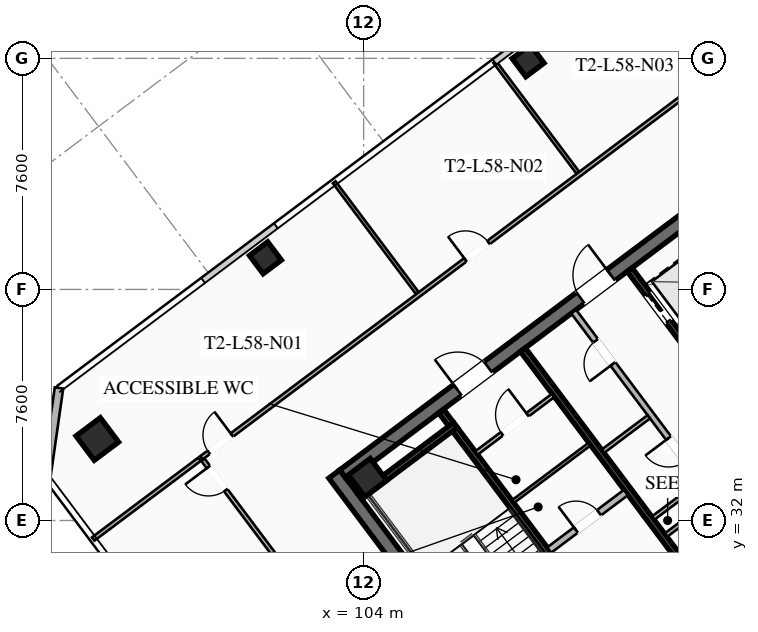
"""IFC4 building model, lengths in metres.
Left out: names, types, materials, properties, quantities, classifications, styles, units other than length and angle.
Written with IfcOpenShell. Run it as: python <this file> out.ifc"""

import sys

from ifc_helpers import new_model, si_unit, direction, frame, frame_2d, origin, origin_2d, place, context, subcontext, project, spatial, rectangle, hollow_rectangle, extrude, element, fill, save


model = new_model("IFC4")
c1 = context("Model", 3, precision=1e-05, world=origin(), true_north=direction((0.0, 1.0)))
c2 = subcontext(c1, "Body", "Model", "MODEL_VIEW")
j1 = project(units=[si_unit("LENGTHUNIT", "METRE"), si_unit("PLANEANGLEUNIT", "RADIAN")], contexts=[c1])
p1 = place(None, origin())
s1 = spatial("IfcSite", under=j1, at=p1, CompositionType="ELEMENT")
p2 = place(p1, origin())
s2 = spatial("IfcBuilding", under=s1, at=p2, CompositionType="ELEMENT")
p3 = place(p2, frame((0.0, 0.0, 214.85)))
s3 = spatial("IfcBuildingStorey", under=s2, at=p3, CompositionType="ELEMENT", Elevation=214.85)
p4 = place(p3, frame((112.396, 21.047, 0.0), z_axis=(0.0, 0.0, 1.0), x_axis=(-0.600005007985, 0.799996243986, 0.0)))
e1 = element("IfcWall", 1, at=p4, inside=s3, PredefinedType="SHEAR", context=c2, shape_type="SweptSolid", body=[
    extrude(rectangle(XDim=15.6, YDim=0.45, at=frame_2d((7.8, 0.0))), origin(), (0.0, 0.0, 1.0), 3.55),
])
p5 = place(p3, frame((103.351, 33.482, 0.0), z_axis=(0.0, 0.0, 1.0), x_axis=(0.8, 0.6, 0.0)))
e2 = element("IfcWall", 2, at=p5, inside=s3, PredefinedType="SHEAR", context=c2, shape_type="SweptSolid", body=[
    extrude(rectangle(XDim=15.26, YDim=0.45, at=frame_2d((7.63, 0.0))), origin(), (0.0, 0.0, 1.0), 3.55),
])
p6 = place(p5, frame((4.68, 0.0, 0.0)))
e3 = element("IfcOpeningElement", 3, at=p6, cuts=e2, PredefinedType="OPENING", context=c2, shape_type="SweptSolid", body=[
    extrude(rectangle(XDim=1.25, YDim=2.25, at=frame_2d((0.625, 1.125))), frame((0.0, 0.235, 0.0), z_axis=(0.0, -1.0, 0.0), x_axis=(1.0, 0.0, 0.0)), (0.0, 0.0, 1.0), 0.47),
])
p7 = place(p5, frame((9.73, 0.0, 0.0)))
e4 = element("IfcOpeningElement", 4, at=p7, cuts=e2, PredefinedType="OPENING", context=c2, shape_type="SweptSolid", body=[
    extrude(rectangle(XDim=1.25, YDim=2.25, at=frame_2d((0.625, 1.125))), frame((0.0, 0.235, 0.0), z_axis=(0.0, -1.0, 0.0), x_axis=(1.0, 0.0, 0.0)), (0.0, 0.0, 1.0), 0.47),
])
p8 = place(p3, frame((104.13, 33.41, 0.0), z_axis=(0.0, 0.0, 1.0), x_axis=(0.799999996291, 0.600000004945, 0.0)))
e5 = element("IfcColumn", 5, at=p8, inside=s3, PredefinedType="COLUMN", context=c2, shape_type="SweptSolid", body=[
    extrude(hollow_rectangle(XDim=0.9, YDim=0.9, WallThickness=0.04, at=origin_2d()), origin(), (0.0, 0.0, 1.0), 3.37),
])
p9 = place(p3, frame((95.24, 34.68, 0.0), z_axis=(0.0, 0.0, 1.0), x_axis=(0.799999996291, 0.600000004945, 0.0)))
e6 = element("IfcColumn", 6, at=p9, inside=s3, PredefinedType="COLUMN", context=c2, shape_type="SweptSolid", body=[
    extrude(hollow_rectangle(XDim=1.0, YDim=1.0, WallThickness=0.04, at=origin_2d()), origin(), (0.0, 0.0, 1.0), 3.37),
])
for number, where, z_axis, x_axis in (
    (7, (109.41, 47.12, 0.0), (0.0, 0.0, 1.0), (0.8, 0.6, 0.0)),
    (8, (100.77, 40.64, 0.0), (0.0, 0.0, 1.0), (0.8, 0.6, 0.0)),
):
    element("IfcColumn", number, at=place(p3, frame(where, z_axis=z_axis, x_axis=x_axis)), inside=s3, PredefinedType="COLUMN", context=c2, shape_type="SweptSolid", body=[
        extrude(hollow_rectangle(XDim=0.75, YDim=0.75, WallThickness=0.032, at=origin_2d()), origin(), (0.0, 0.0, 1.0), 3.37),
    ])
p10 = place(p3, frame((93.56, 33.42, 0.0), z_axis=(0.0, 0.0, 1.0), x_axis=(0.14138683146, 0.989954425158, 0.0)))
e9 = element("IfcWall", 9, at=p10, inside=s3, PredefinedType="SOLIDWALL", context=c2, shape_type="SweptSolid", body=[
    extrude(rectangle(XDim=2.97, YDim=0.28, at=frame_2d((1.485, 0.0))), origin(), (0.0, 0.0, 1.0), 3.37),
])
p11 = place(p3, frame((111.44, 29.08, 0.0), z_axis=(0.0, 0.0, 1.0), x_axis=(-0.59999041401, 0.800007189403, 0.0)))
e10 = element("IfcWall", 10, at=p11, inside=s3, PredefinedType="SHEAR", context=c2, shape_type="SweptSolid", body=[
    extrude(rectangle(XDim=8.15, YDim=0.2, at=frame_2d((4.075, 0.0))), origin(), (0.0, 0.0, 1.0), 3.37),
])
p12 = place(p11, frame((0.45, 0.0, 0.0)))
e11 = element("IfcOpeningElement", 11, at=p12, cuts=e10, PredefinedType="OPENING", context=c2, shape_type="SweptSolid", body=[
    extrude(rectangle(XDim=1.15, YDim=2.2, at=frame_2d((0.575, 1.1))), frame((0.0, 0.11, 0.0), z_axis=(0.0, -1.0, 0.0), x_axis=(1.0, 0.0, 0.0)), (0.0, 0.0, 1.0), 0.22),
])
p13 = place(p3, frame((103.876, 32.782, 0.0), z_axis=(0.0, 0.0, 1.0), x_axis=(0.800014909178, 0.599980120581, 0.0)))
e12 = element("IfcWall", 12, at=p13, inside=s3, PredefinedType="SHEAR", context=c2, shape_type="SweptSolid", body=[
    extrude(rectangle(XDim=3.93, YDim=0.2, at=frame_2d((1.965, 0.0))), origin(), (0.0, 0.0, 1.0), 3.37),
])
p14 = place(p3, frame((118.058, 25.856, 0.0), z_axis=(0.0, 0.0, 1.0), x_axis=(-0.600002657301, 0.799998007018, 0.0)))
e13 = element("IfcWall", 13, at=p14, inside=s3, PredefinedType="SHEAR", context=c2, shape_type="SweptSolid", body=[
    extrude(rectangle(XDim=14.7, YDim=0.2, at=frame_2d((7.35, 0.0))), origin(), (0.0, 0.0, 1.0), 3.37),
])
p15 = place(p3, frame((110.104, 31.028, 0.0), z_axis=(0.0, 0.0, 1.0), x_axis=(0.800018601094, 0.59997519774, 0.0)))
e14 = element("IfcWall", 14, at=p15, inside=s3, PredefinedType="SOLIDWALL", context=c2, shape_type="SweptSolid", body=[
    extrude(rectangle(XDim=3.15, YDim=0.22, at=frame_2d((1.575, 0.0))), origin(), (0.0, 0.0, 1.0), 2.723),
])
p16 = place(p15, frame((1.1, 0.0, 0.0)))
e15 = element("IfcOpeningElement", 15, at=p16, cuts=e14, PredefinedType="OPENING", context=c2, shape_type="SweptSolid", body=[
    extrude(rectangle(XDim=0.95, YDim=2.05, at=frame_2d((0.475, 1.025))), frame((0.0, 0.12, 0.0), z_axis=(0.0, -1.0, 0.0), x_axis=(1.0, 0.0, 0.0)), (0.0, 0.0, 1.0), 0.24),
])
p17 = place(p3, frame((112.75, 40.25, 0.0), z_axis=(0.0, 0.0, 1.0), x_axis=(0.599994036198, -0.800004472816, 0.0)))
e16 = element("IfcWall", 16, at=p17, inside=s3, PredefinedType="SHEAR", context=c2, shape_type="SweptSolid", body=[
    extrude(rectangle(XDim=6.55, YDim=0.2, at=frame_2d((3.275, 0.0))), origin(), (0.0, 0.0, 1.0), 3.37),
])
p18 = place(p17, frame((5.075, 0.0, 0.0)))
e17 = element("IfcOpeningElement", 17, at=p18, cuts=e16, PredefinedType="OPENING", context=c2, shape_type="SweptSolid", body=[
    extrude(rectangle(XDim=1.1, YDim=2.2, at=frame_2d((0.55, 1.1))), frame((0.0, 0.11, 0.0), z_axis=(0.0, -1.0, 0.0), x_axis=(1.0, 0.0, 0.0)), (0.0, 0.0, 1.0), 0.22),
])
p19 = place(p17, frame((3.025, 0.0, 0.0)))
e18 = element("IfcOpeningElement", 18, at=p19, cuts=e16, PredefinedType="OPENING", context=c2, shape_type="SweptSolid", body=[
    extrude(rectangle(XDim=1.1, YDim=2.2, at=frame_2d((0.55, 1.1))), frame((0.0, 0.11, 0.0), z_axis=(0.0, -1.0, 0.0), x_axis=(1.0, 0.0, 0.0)), (0.0, 0.0, 1.0), 0.22),
])
p20 = place(p17, frame((1.025, 0.0, 0.0)))
e19 = element("IfcOpeningElement", 19, at=p20, cuts=e16, PredefinedType="OPENING", context=c2, shape_type="SweptSolid", body=[
    extrude(rectangle(XDim=1.1, YDim=2.2, at=frame_2d((0.55, 1.1))), frame((0.0, 0.11, 0.0), z_axis=(0.0, -1.0, 0.0), x_axis=(1.0, 0.0, 0.0)), (0.0, 0.0, 1.0), 0.22),
])
p21 = place(p3, frame((114.36, 38.27, 0.0), z_axis=(0.0, 0.0, 1.0), x_axis=(0.800008183455, 0.599989088572, 0.0)))
e20 = element("IfcWall", 20, at=p21, inside=s3, PredefinedType="SOLIDWALL", context=c2, shape_type="SweptSolid", body=[
    extrude(rectangle(XDim=3.58, YDim=0.2, at=frame_2d((1.79, 0.0))), origin(), (0.0, 0.0, 1.0), 3.37),
])
p22 = place(p3, frame((107.71, 34.22, 0.0), z_axis=(0.0, 0.0, 1.0), x_axis=(0.799981399002, 0.60002480053, 0.0)))
e21 = element("IfcWall", 21, at=p22, inside=s3, PredefinedType="PARTITIONING", context=c2, shape_type="SweptSolid", body=[
    extrude(rectangle(XDim=3.15, YDim=0.135, at=frame_2d((1.575, 0.0))), origin(), (0.0, 0.0, 1.0), 2.723),
])
p23 = place(p22, frame((1.05, 0.0, 0.0)))
e22 = element("IfcOpeningElement", 22, at=p23, cuts=e21, PredefinedType="OPENING", context=c2, shape_type="SweptSolid", body=[
    extrude(rectangle(XDim=1.05, YDim=2.2, at=frame_2d((0.525, 1.1))), frame((0.0, 0.077, 0.0), z_axis=(0.0, -1.0, 0.0), x_axis=(1.0, 0.0, 0.0)), (0.0, 0.0, 1.0), 0.155),
])
p24 = place(p3, frame((108.91, 32.62, 0.0), z_axis=(0.0, 0.0, 1.0), x_axis=(0.800018601094, 0.59997519774, 0.0)))
e23 = element("IfcWall", 23, at=p24, inside=s3, PredefinedType="PARTITIONING", context=c2, shape_type="SweptSolid", body=[
    extrude(rectangle(XDim=3.15, YDim=0.11, at=frame_2d((1.575, 0.0))), origin(), (0.0, 0.0, 1.0), 2.723),
])
p25 = place(p3, frame((113.946, 31.522, 0.0), z_axis=(0.0, 0.0, 1.0), x_axis=(0.8, 0.6, 0.0)))
e24 = element("IfcWall", 24, at=p25, inside=s3, PredefinedType="PARTITIONING", context=c2, shape_type="SweptSolid", body=[
    extrude(rectangle(XDim=1.88, YDim=0.135, at=frame_2d((0.94, 0.0))), origin(), (0.0, 0.0, 1.0), 2.723),
])
p26 = place(p3, frame((115.11, 33.27, 0.0), z_axis=(0.0, 0.0, 1.0), x_axis=(-0.600011160345, 0.79999162962, 0.0)))
e25 = element("IfcWall", 25, at=p26, inside=s3, PredefinedType="SOLIDWALL", context=c2, shape_type="SweptSolid", body=[
    extrude(rectangle(XDim=7.0, YDim=0.2, at=frame_2d((3.5, 0.0))), origin(), (0.0, 0.0, 1.0), 2.723),
])
p27 = place(p26, frame((0.85, 0.0, 0.0)))
e26 = element("IfcOpeningElement", 26, at=p27, cuts=e25, PredefinedType="OPENING", context=c2, shape_type="SweptSolid", body=[
    extrude(rectangle(XDim=0.95, YDim=2.05, at=frame_2d((0.475, 1.025))), frame((0.0, 0.11, 0.0), z_axis=(0.0, -1.0, 0.0), x_axis=(1.0, 0.0, 0.0)), (0.0, 0.0, 1.0), 0.22),
])
p28 = place(p26, frame((4.85, 0.0, 0.0)))
e27 = element("IfcOpeningElement", 27, at=p28, cuts=e25, PredefinedType="OPENING", context=c2, shape_type="SweptSolid", body=[
    extrude(rectangle(XDim=0.95, YDim=2.05, at=frame_2d((0.475, 1.025))), frame((0.0, 0.11, 0.0), z_axis=(0.0, -1.0, 0.0), x_axis=(1.0, 0.0, 0.0)), (0.0, 0.0, 1.0), 0.22),
])
p29 = place(p3, frame((113.526, 32.082, 0.0), z_axis=(0.0, 0.0, 1.0), x_axis=(0.800046745961, 0.599937666993, 0.0)))
e28 = element("IfcWall", 28, at=p29, inside=s3, PredefinedType="PARTITIONING", context=c2, shape_type="SweptSolid", body=[
    extrude(rectangle(XDim=1.88, YDim=0.135, at=frame_2d((0.94, 0.0))), origin(), (0.0, 0.0, 1.0), 2.723),
])
p30 = place(p3, frame((111.876, 34.282, 0.0), z_axis=(0.0, 0.0, 1.0), x_axis=(0.8, 0.6, 0.0)))
e29 = element("IfcWall", 29, at=p30, inside=s3, PredefinedType="PARTITIONING", context=c2, shape_type="SweptSolid", body=[
    extrude(rectangle(XDim=1.88, YDim=0.135, at=frame_2d((0.94, 0.0))), origin(), (0.0, 0.0, 1.0), 2.723),
])
p31 = place(p3, frame((98.666, 34.062, 0.0), z_axis=(0.0, 0.0, 1.0), x_axis=(0.800003619866, 0.599995173482, 0.0)))
e30 = element("IfcWall", 30, at=p31, inside=s3, PredefinedType="PARTITIONING", context=c2, shape_type="SweptSolid", body=[
    extrude(rectangle(XDim=24.28, YDim=0.135, at=frame_2d((12.14, 0.0))), origin(), (0.0, 0.0, 1.0), 2.723),
])
p32 = place(p31, frame((0.3, 0.0, 0.0)))
e31 = element("IfcOpeningElement", 31, at=p32, cuts=e30, PredefinedType="OPENING", context=c2, shape_type="SweptSolid", body=[
    extrude(rectangle(XDim=0.95, YDim=2.05, at=frame_2d((0.475, 1.025))), frame((0.0, 0.077, 0.0), z_axis=(0.0, -1.0, 0.0), x_axis=(1.0, 0.0, 0.0)), (0.0, 0.0, 1.0), 0.155),
])
p33 = place(p31, frame((10.854, 0.0, 0.0)))
e32 = element("IfcOpeningElement", 32, at=p33, cuts=e30, PredefinedType="OPENING", context=c2, shape_type="SweptSolid", body=[
    extrude(rectangle(XDim=0.95, YDim=2.05, at=frame_2d((0.475, 1.025))), frame((0.0, 0.077, 0.0), z_axis=(0.0, -1.0, 0.0), x_axis=(1.0, 0.0, 0.0)), (0.0, 0.0, 1.0), 0.155),
])
p34 = place(p31, frame((23.03, 0.0, 0.0)))
e33 = element("IfcOpeningElement", 33, at=p34, cuts=e30, PredefinedType="OPENING", context=c2, shape_type="SweptSolid", body=[
    extrude(rectangle(XDim=0.95, YDim=2.05, at=frame_2d((0.475, 1.025))), frame((0.0, 0.077, 0.0), z_axis=(0.0, -1.0, 0.0), x_axis=(1.0, 0.0, 0.0)), (0.0, 0.0, 1.0), 0.155),
])
p35 = place(p3, frame((105.762, 39.484, 0.0), z_axis=(0.0, 0.0, 1.0), x_axis=(-0.599982829901, 0.800012877287, 0.0)))
e34 = element("IfcWall", 34, at=p35, inside=s3, PredefinedType="PARTITIONING", context=c2, shape_type="SweptSolid", body=[
    extrude(rectangle(XDim=4.55, YDim=0.11, at=frame_2d((2.275, 0.0))), origin(), (0.0, 0.0, 1.0), 2.723),
])
p36 = place(p3, frame((111.042, 43.444, 0.0), z_axis=(0.0, 0.0, 1.0), x_axis=(-0.600008585315, 0.799993560942, 0.0)))
e35 = element("IfcWall", 35, at=p36, inside=s3, PredefinedType="PARTITIONING", context=c2, shape_type="SweptSolid", body=[
    extrude(rectangle(XDim=4.55, YDim=0.11, at=frame_2d((2.275, 0.0))), origin(), (0.0, 0.0, 1.0), 2.723),
])
p37 = place(p3, frame((110.87, 17.79, 0.0), z_axis=(0.0, 0.0, 1.0), x_axis=(-0.6, 0.8, 0.0)))
e36 = element("IfcWall", 36, at=p37, inside=s3, PredefinedType="PARTITIONING", context=c2, shape_type="SweptSolid", body=[
    extrude(rectangle(XDim=20.26, YDim=0.135, at=frame_2d((10.13, 0.0))), origin(), (0.0, 0.0, 1.0), 2.723),
])
p38 = place(p37, frame((19.01, 0.0, 0.0)))
e37 = element("IfcOpeningElement", 37, at=p38, cuts=e36, PredefinedType="OPENING", context=c2, shape_type="SweptSolid", body=[
    extrude(rectangle(XDim=0.95, YDim=2.05, at=frame_2d((0.475, 1.025))), frame((0.0, 0.077, 0.0), z_axis=(0.0, -1.0, 0.0), x_axis=(1.0, 0.0, 0.0)), (0.0, 0.0, 1.0), 0.155),
])
p39 = place(p3, frame((98.602, 34.014, 0.0), z_axis=(0.0, 0.0, 1.0), x_axis=(-0.800026815742, -0.599964244012, 0.0)))
e38 = element("IfcWall", 38, at=p39, inside=s3, PredefinedType="PARTITIONING", context=c2, shape_type="SweptSolid", body=[
    extrude(rectangle(XDim=4.37, YDim=0.135, at=frame_2d((2.185, 0.0))), origin(), (0.0, 0.0, 1.0), 2.723),
])
p40 = place(p6, origin())
e39 = element("IfcDoor", 39, at=p40, inside=s3, OperationType="SINGLE_SWING_LEFT", PredefinedType="DOOR", context=c2, shape_type="SweptSolid", body=[
    extrude(rectangle(XDim=1.25, YDim=2.25, at=frame_2d((0.625, 1.125))), frame((0.0, 0.025, 0.0), z_axis=(0.0, -1.0, 0.0), x_axis=(1.0, 0.0, 0.0)), (0.0, 0.0, 1.0), 0.05),
])
fill(e3, e39)
p41 = place(p7, origin())
e40 = element("IfcDoor", 40, at=p41, inside=s3, OperationType="SINGLE_SWING_RIGHT", PredefinedType="DOOR", context=c2, shape_type="SweptSolid", body=[
    extrude(rectangle(XDim=1.25, YDim=2.25, at=frame_2d((0.625, 1.125))), frame((0.0, 0.025, 0.0), z_axis=(0.0, -1.0, 0.0), x_axis=(1.0, 0.0, 0.0)), (0.0, 0.0, 1.0), 0.05),
])
fill(e4, e40)
p42 = place(p23, origin())
e41 = element("IfcDoor", 41, at=p42, inside=s3, OperationType="SINGLE_SWING_RIGHT", PredefinedType="DOOR", context=c2, shape_type="SweptSolid", body=[
    extrude(rectangle(XDim=1.05, YDim=2.2, at=frame_2d((0.525, 1.1))), frame((0.0, 0.025, 0.0), z_axis=(0.0, -1.0, 0.0), x_axis=(1.0, 0.0, 0.0)), (0.0, 0.0, 1.0), 0.05),
])
fill(e22, e41)
p43 = place(p16, origin())
e42 = element("IfcDoor", 42, at=p43, inside=s3, OperationType="SINGLE_SWING_LEFT", PredefinedType="DOOR", context=c2, shape_type="SweptSolid", body=[
    extrude(rectangle(XDim=0.95, YDim=2.05, at=frame_2d((0.475, 1.025))), frame((0.0, 0.025, 0.0), z_axis=(0.0, -1.0, 0.0), x_axis=(1.0, 0.0, 0.0)), (0.0, 0.0, 1.0), 0.05),
])
fill(e15, e42)
p44 = place(p27, origin())
e43 = element("IfcDoor", 43, at=p44, inside=s3, OperationType="SINGLE_SWING_RIGHT", PredefinedType="DOOR", context=c2, shape_type="SweptSolid", body=[
    extrude(rectangle(XDim=0.95, YDim=2.05, at=frame_2d((0.475, 1.025))), frame((0.0, 0.025, 0.0), z_axis=(0.0, -1.0, 0.0), x_axis=(1.0, 0.0, 0.0)), (0.0, 0.0, 1.0), 0.05),
])
fill(e26, e43)
p45 = place(p28, origin())
e44 = element("IfcDoor", 44, at=p45, inside=s3, OperationType="SINGLE_SWING_LEFT", PredefinedType="DOOR", context=c2, shape_type="SweptSolid", body=[
    extrude(rectangle(XDim=0.95, YDim=2.05, at=frame_2d((0.475, 1.025))), frame((0.0, 0.025, 0.0), z_axis=(0.0, -1.0, 0.0), x_axis=(1.0, 0.0, 0.0)), (0.0, 0.0, 1.0), 0.05),
])
fill(e27, e44)
p46 = place(p32, origin())
e45 = element("IfcDoor", 45, at=p46, inside=s3, OperationType="SINGLE_SWING_RIGHT", PredefinedType="DOOR", context=c2, shape_type="SweptSolid", body=[
    extrude(rectangle(XDim=0.95, YDim=2.05, at=frame_2d((0.475, 1.025))), frame((0.0, 0.025, 0.0), z_axis=(0.0, -1.0, 0.0), x_axis=(1.0, 0.0, 0.0)), (0.0, 0.0, 1.0), 0.05),
])
fill(e31, e45)
p47 = place(p33, origin())
e46 = element("IfcDoor", 46, at=p47, inside=s3, OperationType="SINGLE_SWING_LEFT", PredefinedType="DOOR", context=c2, shape_type="SweptSolid", body=[
    extrude(rectangle(XDim=0.95, YDim=2.05, at=frame_2d((0.475, 1.025))), frame((0.0, 0.025, 0.0), z_axis=(0.0, -1.0, 0.0), x_axis=(1.0, 0.0, 0.0)), (0.0, 0.0, 1.0), 0.05),
])
fill(e32, e46)
p48 = place(p38, origin())
e47 = element("IfcDoor", 47, at=p48, inside=s3, OperationType="SINGLE_SWING_RIGHT", PredefinedType="DOOR", context=c2, shape_type="SweptSolid", body=[
    extrude(rectangle(XDim=0.95, YDim=2.05, at=frame_2d((0.475, 1.025))), frame((0.0, 0.025, 0.0), z_axis=(0.0, -1.0, 0.0), x_axis=(1.0, 0.0, 0.0)), (0.0, 0.0, 1.0), 0.05),
])
fill(e37, e47)
p49 = place(p20, origin())
e48 = element("IfcDoor", 48, at=p49, inside=s3, OperationType="SLIDING_TO_LEFT", PredefinedType="DOOR", context=c2, shape_type="SweptSolid", body=[
    extrude(rectangle(XDim=1.1, YDim=2.2, at=frame_2d((0.55, 1.1))), frame((0.0, 0.025, 0.0), z_axis=(0.0, -1.0, 0.0), x_axis=(1.0, 0.0, 0.0)), (0.0, 0.0, 1.0), 0.05),
])
fill(e19, e48)
save(model, sys.argv[1])
